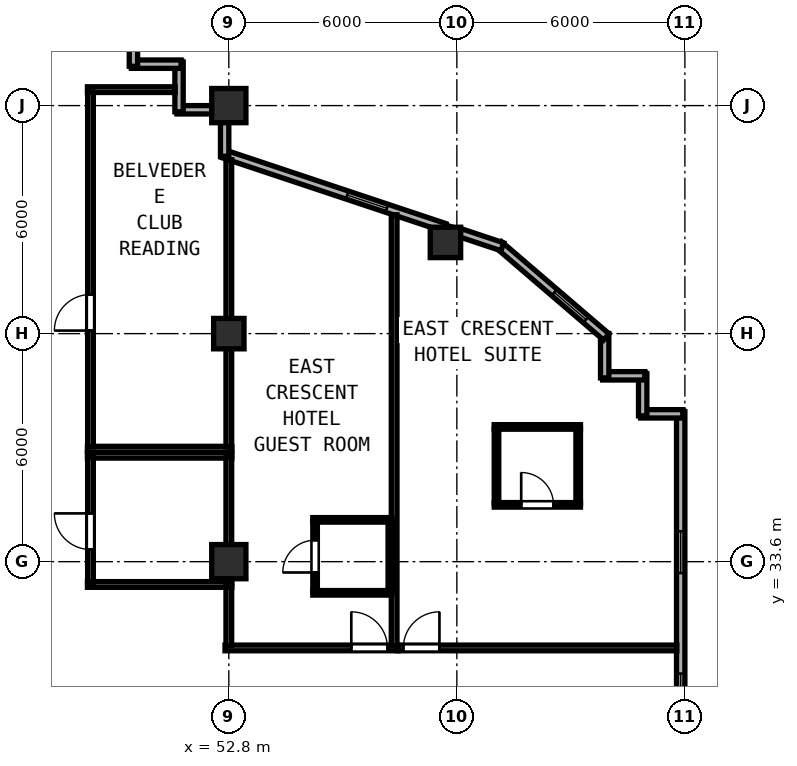
"""IFC4 building model, lengths in metres.
Left out: names, types, materials, properties, quantities, classifications, styles, units other than length and angle.
Written with IfcOpenShell. Run it as: python <this file> out.ifc"""

import sys

from ifc_helpers import new_model, si_unit, direction, frame, frame_2d, origin, origin_2d, place, context, subcontext, project, spatial, rectangle, hollow_rectangle, extrude, element, fill, save


model = new_model("IFC4")
c1 = context("Model", 3, precision=1e-05, world=origin(), true_north=direction((0.0, 1.0)))
c2 = subcontext(c1, "Body", "Model", "MODEL_VIEW")
j1 = project(units=[si_unit("LENGTHUNIT", "METRE"), si_unit("PLANEANGLEUNIT", "RADIAN")], contexts=[c1])
p1 = place(None, origin())
s1 = spatial("IfcSite", under=j1, at=p1, CompositionType="ELEMENT")
p2 = place(p1, origin())
s2 = spatial("IfcBuilding", under=s1, at=p2, CompositionType="ELEMENT")
p3 = place(p2, frame((0.0, 0.0, 199.4)))
s3 = spatial("IfcBuildingStorey", under=s2, at=p3, CompositionType="ELEMENT", Elevation=199.4)
for number, where, z_axis, x_axis in (
    (1, (52.8, 33.6, 0.0), (0.0, 0.0, 1.0), (1.0, 0.0, 0.0)),
    (2, (52.8, 45.6, 0.0), (0.0, 0.0, 1.0), (1.0, 0.0, 0.0)),
):
    element("IfcColumn", number, at=place(p3, frame(where, z_axis=z_axis, x_axis=x_axis)), inside=s3, PredefinedType="COLUMN", context=c2, shape_type="SweptSolid", body=[
        extrude(hollow_rectangle(XDim=0.9, YDim=0.9, WallThickness=0.034, at=origin_2d()), origin(), (0.0, 0.0, 1.0), 3.8),
    ])
for number, where, z_axis, x_axis in (
    (3, (52.8, 39.6, 0.0), (0.0, 0.0, 1.0), (1.0, 0.0, 0.0)),
    (4, (58.5, 42.0, 0.0), (0.0, 0.0, 1.0), (1.0, 0.0, 0.0)),
):
    element("IfcColumn", number, at=place(p3, frame(where, z_axis=z_axis, x_axis=x_axis)), inside=s3, PredefinedType="COLUMN", context=c2, shape_type="SweptSolid", body=[
        extrude(hollow_rectangle(XDim=0.8, YDim=0.8, WallThickness=0.03, at=origin_2d()), origin(), (0.0, 0.0, 1.0), 3.8),
    ])
p4 = place(p3, frame((64.69, 16.4, 0.0), z_axis=(0.0, 0.0, 1.0), x_axis=(0.0, 1.0, 0.0)))
e5 = element("IfcWall", 5, at=p4, inside=s3, PredefinedType="SOLIDWALL", context=c2, shape_type="SweptSolid", body=[
    extrude(rectangle(XDim=21.145, YDim=0.22, at=frame_2d((10.573, 0.0))), origin(), (0.0, 0.0, 1.0), 3.62),
])
p5 = place(p4, frame((1.05, 0.0, 0.85)))
e6 = element("IfcOpeningElement", 6, at=p5, cuts=e5, PredefinedType="OPENING", context=c2, shape_type="SweptSolid", body=[
    extrude(rectangle(XDim=1.1, YDim=1.75, at=frame_2d((0.55, 0.875))), frame((0.0, 0.12, 0.0), z_axis=(0.0, -1.0, 0.0), x_axis=(1.0, 0.0, 0.0)), (0.0, 0.0, 1.0), 0.24),
])
p6 = place(p4, frame((6.1, 0.0, 0.85)))
e7 = element("IfcOpeningElement", 7, at=p6, cuts=e5, PredefinedType="OPENING", context=c2, shape_type="SweptSolid", body=[
    extrude(rectangle(XDim=1.1, YDim=1.75, at=frame_2d((0.55, 0.875))), frame((0.0, 0.12, 0.0), z_axis=(0.0, -1.0, 0.0), x_axis=(1.0, 0.0, 0.0)), (0.0, 0.0, 1.0), 0.24),
])
p7 = place(p4, frame((13.155, 0.0, 0.85)))
e8 = element("IfcOpeningElement", 8, at=p7, cuts=e5, PredefinedType="OPENING", context=c2, shape_type="SweptSolid", body=[
    extrude(rectangle(XDim=1.1, YDim=1.75, at=frame_2d((0.55, 0.875))), frame((0.0, 0.12, 0.0), z_axis=(0.0, -1.0, 0.0), x_axis=(1.0, 0.0, 0.0)), (0.0, 0.0, 1.0), 0.24),
])
p8 = place(p4, frame((16.9, 0.0, 0.85)))
e9 = element("IfcOpeningElement", 9, at=p8, cuts=e5, PredefinedType="OPENING", context=c2, shape_type="SweptSolid", body=[
    extrude(rectangle(XDim=1.1, YDim=1.75, at=frame_2d((0.55, 0.875))), frame((0.0, 0.12, 0.0), z_axis=(0.0, -1.0, 0.0), x_axis=(1.0, 0.0, 0.0)), (0.0, 0.0, 1.0), 0.24),
])
p9 = place(p3, frame((64.745, 37.49, 0.0), z_axis=(0.0, 0.0, 1.0), x_axis=(-1.0, 0.0, 0.0)))
e10 = element("IfcWall", 10, at=p9, inside=s3, PredefinedType="SOLIDWALL", context=c2, shape_type="SweptSolid", body=[
    extrude(rectangle(XDim=1.11, YDim=0.22, at=frame_2d((0.555, 0.0))), origin(), (0.0, 0.0, 1.0), 3.62),
])
p10 = place(p3, frame((63.69, 37.435, 0.0), z_axis=(0.0, 0.0, 1.0), x_axis=(0.0, 1.0, 0.0)))
e11 = element("IfcWall", 11, at=p10, inside=s3, PredefinedType="SOLIDWALL", context=c2, shape_type="SweptSolid", body=[
    extrude(rectangle(XDim=1.11, YDim=0.22, at=frame_2d((0.555, 0.0))), origin(), (0.0, 0.0, 1.0), 3.62),
])
p11 = place(p3, frame((63.745, 38.49, 0.0), z_axis=(0.0, 0.0, 1.0), x_axis=(-1.0, 0.0, 0.0)))
e12 = element("IfcWall", 12, at=p11, inside=s3, PredefinedType="SOLIDWALL", context=c2, shape_type="SweptSolid", body=[
    extrude(rectangle(XDim=1.11, YDim=0.22, at=frame_2d((0.555, 0.0))), origin(), (0.0, 0.0, 1.0), 3.62),
])
p12 = place(p3, frame((62.69, 38.435, 0.0), z_axis=(0.0, 0.0, 1.0), x_axis=(0.0, 1.0, 0.0)))
e13 = element("IfcWall", 13, at=p12, inside=s3, PredefinedType="SOLIDWALL", context=c2, shape_type="SweptSolid", body=[
    extrude(rectangle(XDim=1.169, YDim=0.22, at=frame_2d((0.585, 0.0))), origin(), (0.0, 0.0, 1.0), 3.62),
])
p13 = place(p3, frame((62.732, 39.514, 0.0), z_axis=(0.0, 0.0, 1.0), x_axis=(-0.759251976569, 0.65079677018, 0.0)))
e14 = element("IfcWall", 14, at=p13, inside=s3, PredefinedType="SOLIDWALL", context=c2, shape_type="SweptSolid", body=[
    extrude(rectangle(XDim=3.726, YDim=0.22, at=frame_2d((1.863, 0.0))), origin(), (0.0, 0.0, 1.0), 3.62),
])
p14 = place(p13, frame((0.7, 0.0, 0.85)))
e15 = element("IfcOpeningElement", 15, at=p14, cuts=e14, PredefinedType="OPENING", context=c2, shape_type="SweptSolid", body=[
    extrude(rectangle(XDim=1.1, YDim=1.75, at=frame_2d((0.55, 0.875))), frame((0.0, 0.12, 0.0), z_axis=(0.0, -1.0, 0.0), x_axis=(1.0, 0.0, 0.0)), (0.0, 0.0, 1.0), 0.24),
])
p15 = place(p3, frame((59.997, 41.885, 0.0), z_axis=(0.0, 0.0, 1.0), x_axis=(-0.948662335685, 0.316290646166, 0.0)))
e16 = element("IfcWall", 16, at=p15, inside=s3, PredefinedType="SOLIDWALL", context=c2, shape_type="SweptSolid", body=[
    extrude(rectangle(XDim=1.165, YDim=0.22, at=frame_2d((0.583, 0.0))), origin(), (0.0, 0.0, 1.0), 3.62),
])
p16 = place(p3, frame((58.476, 42.392, 0.0), z_axis=(0.0, 0.0, 1.0), x_axis=(-0.948691231611, 0.316203964339, 0.0)))
e17 = element("IfcWall", 17, at=p16, inside=s3, PredefinedType="SOLIDWALL", context=c2, shape_type="SweptSolid", body=[
    extrude(rectangle(XDim=6.154, YDim=0.22, at=frame_2d((3.077, 0.0))), origin(), (0.0, 0.0, 1.0), 3.215),
])
p17 = place(p16, frame((1.599, 0.0, 0.85)))
e18 = element("IfcOpeningElement", 18, at=p17, cuts=e17, PredefinedType="OPENING", context=c2, shape_type="SweptSolid", body=[
    extrude(rectangle(XDim=1.1, YDim=1.75, at=frame_2d((0.55, 0.875))), frame((0.0, 0.12, 0.0), z_axis=(0.0, -1.0, 0.0), x_axis=(1.0, 0.0, 0.0)), (0.0, 0.0, 1.0), 0.24),
])
p18 = place(p3, frame((52.69, 44.266, 0.0), z_axis=(0.0, 0.0, 1.0), x_axis=(0.0, 1.0, 0.0)))
e19 = element("IfcWall", 19, at=p18, inside=s3, PredefinedType="SOLIDWALL", context=c2, shape_type="SweptSolid", body=[
    extrude(rectangle(XDim=0.892, YDim=0.22, at=frame_2d((0.446, 0.0))), origin(), (0.0, 0.0, 1.0), 3.215),
])
p19 = place(p3, frame((52.358, 45.49, 0.0), z_axis=(0.0, 0.0, 1.0), x_axis=(-1.0, 0.0, 0.0)))
e20 = element("IfcWall", 20, at=p19, inside=s3, PredefinedType="SOLIDWALL", context=c2, shape_type="SweptSolid", body=[
    extrude(rectangle(XDim=0.923, YDim=0.22, at=frame_2d((0.461, 0.0))), origin(), (0.0, 0.0, 1.0), 3.62),
])
p20 = place(p3, frame((51.49, 45.435, 0.0), z_axis=(0.0, 0.0, 1.0), x_axis=(0.0, 1.0, 0.0)))
e21 = element("IfcWall", 21, at=p20, inside=s3, PredefinedType="SOLIDWALL", context=c2, shape_type="SweptSolid", body=[
    extrude(rectangle(XDim=1.31, YDim=0.22, at=frame_2d((0.655, 0.0))), origin(), (0.0, 0.0, 1.0), 3.62),
])
p21 = place(p3, frame((51.545, 46.69, 0.0), z_axis=(0.0, 0.0, 1.0), x_axis=(-1.0, 0.0, 0.0)))
e22 = element("IfcWall", 22, at=p21, inside=s3, PredefinedType="SOLIDWALL", context=c2, shape_type="SweptSolid", body=[
    extrude(rectangle(XDim=1.31, YDim=0.22, at=frame_2d((0.655, 0.0))), origin(), (0.0, 0.0, 1.0), 3.62),
])
p22 = place(p3, frame((50.29, 46.635, 0.0), z_axis=(0.0, 0.0, 1.0), x_axis=(0.0, 1.0, 0.0)))
e23 = element("IfcWall", 23, at=p22, inside=s3, PredefinedType="SOLIDWALL", context=c2, shape_type="SweptSolid", body=[
    extrude(rectangle(XDim=1.535, YDim=0.22, at=frame_2d((0.768, 0.0))), origin(), (0.0, 0.0, 1.0), 3.62),
])
for number, where, z_axis, x_axis in (
    (24, (49.08, 36.4, 0.0), (0.0, 0.0, 1.0), (1.0, 0.0, 0.0)),
    (25, (49.08, 33.0, 0.0), (0.0, 0.0, 1.0), (1.0, 0.0, 0.0)),
):
    element("IfcWall", number, at=place(p3, frame(where, z_axis=z_axis, x_axis=x_axis)), inside=s3, PredefinedType="PARTITIONING", context=c2, shape_type="SweptSolid", body=[
        extrude(rectangle(XDim=3.8, YDim=0.15, at=frame_2d((1.9, 0.0))), origin(), (0.0, 0.0, 1.0), 3.62),
    ])
p23 = place(p3, frame((49.16, 33.06, 0.0), z_axis=(0.0, 0.0, 1.0), x_axis=(0.0, 1.0, 0.0)))
e26 = element("IfcWall", 26, at=p23, inside=s3, PredefinedType="PARTITIONING", context=c2, shape_type="SweptSolid", body=[
    extrude(rectangle(XDim=3.28, YDim=0.15, at=frame_2d((1.64, 0.0))), origin(), (0.0, 0.0, 1.0), 3.62),
])
p24 = place(p23, frame((0.86, 0.0, 0.0)))
e27 = element("IfcOpeningElement", 27, at=p24, cuts=e26, PredefinedType="OPENING", context=c2, shape_type="SweptSolid", body=[
    extrude(rectangle(XDim=0.95, YDim=2.12, at=frame_2d((0.475, 1.06))), frame((0.0, 0.085, 0.0), z_axis=(0.0, -1.0, 0.0), x_axis=(1.0, 0.0, 0.0)), (0.0, 0.0, 1.0), 0.17),
])
p25 = place(p3, frame((52.8, 33.06, 0.0), z_axis=(0.0, 0.0, 1.0), x_axis=(0.0, 1.0, 0.0)))
e28 = element("IfcWall", 28, at=p25, inside=s3, PredefinedType="PARTITIONING", context=c2, shape_type="SweptSolid", body=[
    extrude(rectangle(XDim=3.28, YDim=0.15, at=frame_2d((1.64, 0.0))), origin(), (0.0, 0.0, 1.0), 3.215),
])
p26 = place(p3, frame((49.08, 46.02, 0.0), z_axis=(0.0, 0.0, 1.0), x_axis=(1.0, 0.0, 0.0)))
e29 = element("IfcWall", 29, at=p26, inside=s3, PredefinedType="PARTITIONING", context=c2, shape_type="SweptSolid", body=[
    extrude(rectangle(XDim=2.308, YDim=0.15, at=frame_2d((1.154, 0.0))), origin(), (0.0, 0.0, 1.0), 3.62),
])
p27 = place(p3, frame((49.08, 36.56, 0.0), z_axis=(0.0, 0.0, 1.0), x_axis=(1.0, 0.0, 0.0)))
e30 = element("IfcWall", 30, at=p27, inside=s3, PredefinedType="PARTITIONING", context=c2, shape_type="SweptSolid", body=[
    extrude(rectangle(XDim=3.8, YDim=0.15, at=frame_2d((1.9, 0.0))), origin(), (0.0, 0.0, 1.0), 3.62),
])
p28 = place(p3, frame((49.16, 36.62, 0.0), z_axis=(0.0, 0.0, 1.0), x_axis=(0.0, 1.0, 0.0)))
e31 = element("IfcWall", 31, at=p28, inside=s3, PredefinedType="PARTITIONING", context=c2, shape_type="SweptSolid", body=[
    extrude(rectangle(XDim=9.34, YDim=0.15, at=frame_2d((4.67, 0.0))), origin(), (0.0, 0.0, 1.0), 3.62),
])
p29 = place(p28, frame((3.06, 0.0, 0.0)))
e32 = element("IfcOpeningElement", 32, at=p29, cuts=e31, PredefinedType="OPENING", context=c2, shape_type="SweptSolid", body=[
    extrude(rectangle(XDim=0.95, YDim=2.12, at=frame_2d((0.475, 1.06))), frame((0.0, 0.085, 0.0), z_axis=(0.0, -1.0, 0.0), x_axis=(1.0, 0.0, 0.0)), (0.0, 0.0, 1.0), 0.17),
])
p30 = place(p3, frame((52.8, 36.62, 0.0), z_axis=(0.0, 0.0, 1.0), x_axis=(0.0, 1.0, 0.0)))
e33 = element("IfcWall", 33, at=p30, inside=s3, PredefinedType="PARTITIONING", context=c2, shape_type="SweptSolid", body=[
    extrude(rectangle(XDim=7.556, YDim=0.15, at=frame_2d((3.778, 0.0))), origin(), (0.0, 0.0, 1.0), 3.215),
])
p31 = place(p3, frame((52.7, 31.33, 0.0), z_axis=(0.0, 0.0, 1.0), x_axis=(1.0, 0.0, 0.0)))
e34 = element("IfcWall", 34, at=p31, inside=s3, PredefinedType="PARTITIONING", context=c2, shape_type="SweptSolid", body=[
    extrude(rectangle(XDim=4.55, YDim=0.15, at=frame_2d((2.275, 0.0))), origin(), (0.0, 0.0, 1.0), 3.62),
])
p32 = place(p31, frame((3.323, 0.0, 0.0)))
e35 = element("IfcOpeningElement", 35, at=p32, cuts=e34, PredefinedType="OPENING", context=c2, shape_type="SweptSolid", body=[
    extrude(rectangle(XDim=0.95, YDim=2.15, at=frame_2d((0.475, 1.075))), frame((0.0, 0.085, 0.0), z_axis=(0.0, -1.0, 0.0), x_axis=(1.0, 0.0, 0.0)), (0.0, 0.0, 1.0), 0.17),
])
p33 = place(p3, frame((52.8, 31.39, 0.0), z_axis=(0.0, 0.0, 1.0), x_axis=(0.0, 1.0, 0.0)))
e36 = element("IfcWall", 36, at=p33, inside=s3, PredefinedType="PARTITIONING", context=c2, shape_type="SweptSolid", body=[
    extrude(rectangle(XDim=1.55, YDim=0.15, at=frame_2d((0.775, 0.0))), origin(), (0.0, 0.0, 1.0), 3.215),
])
p34 = place(p3, frame((57.15, 31.39, 0.0), z_axis=(0.0, 0.0, 1.0), x_axis=(0.0, 1.0, 0.0)))
e37 = element("IfcWall", 37, at=p34, inside=s3, PredefinedType="PARTITIONING", context=c2, shape_type="SweptSolid", body=[
    extrude(rectangle(XDim=11.337, YDim=0.15, at=frame_2d((5.668, 0.0))), origin(), (0.0, 0.0, 1.0), 3.62),
])
for number, where, z_axis, x_axis in (
    (38, (55.01, 34.7, 0.0), (0.0, 0.0, 1.0), (1.0, 0.0, 0.0)),
    (39, (55.01, 32.78, 0.0), (0.0, 0.0, 1.0), (1.0, 0.0, 0.0)),
):
    element("IfcWall", number, at=place(p3, frame(where, z_axis=z_axis, x_axis=x_axis)), inside=s3, PredefinedType="PARTITIONING", context=c2, shape_type="SweptSolid", body=[
        extrude(rectangle(XDim=2.08, YDim=0.12, at=frame_2d((1.04, 0.0))), origin(), (0.0, 0.0, 1.0), 3.62),
    ])
p35 = place(p3, frame((55.07, 32.825, 0.0), z_axis=(0.0, 0.0, 1.0), x_axis=(0.0, 1.0, 0.0)))
e40 = element("IfcWall", 40, at=p35, inside=s3, PredefinedType="PARTITIONING", context=c2, shape_type="SweptSolid", body=[
    extrude(rectangle(XDim=1.83, YDim=0.12, at=frame_2d((0.915, 0.0))), origin(), (0.0, 0.0, 1.0), 3.62),
])
p36 = place(p35, frame((1.34, 0.0, 0.0), z_axis=(0.0, 0.0, 1.0), x_axis=(-1.0, 0.0, 0.0)))
e41 = element("IfcOpeningElement", 41, at=p36, cuts=e40, PredefinedType="OPENING", context=c2, shape_type="SweptSolid", body=[
    extrude(rectangle(XDim=0.85, YDim=2.1, at=frame_2d((0.425, 1.05))), frame((0.0, 0.07, 0.0), z_axis=(0.0, -1.0, 0.0), x_axis=(1.0, 0.0, 0.0)), (0.0, 0.0, 1.0), 0.14),
])
p37 = place(p3, frame((57.05, 32.825, 0.0), z_axis=(0.0, 0.0, 1.0), x_axis=(0.0, 1.0, 0.0)))
e42 = element("IfcWall", 42, at=p37, inside=s3, PredefinedType="PARTITIONING", context=c2, shape_type="SweptSolid", body=[
    extrude(rectangle(XDim=1.83, YDim=0.12, at=frame_2d((0.915, 0.0))), origin(), (0.0, 0.0, 1.0), 3.62),
])
p38 = place(p3, frame((57.252, 31.33, 0.0), z_axis=(0.0, 0.0, 1.0), x_axis=(1.0, 0.0, 0.0)))
e43 = element("IfcWall", 43, at=p38, inside=s3, PredefinedType="PARTITIONING", context=c2, shape_type="SweptSolid", body=[
    extrude(rectangle(XDim=7.336, YDim=0.15, at=frame_2d((3.668, 0.0))), origin(), (0.0, 0.0, 1.0), 3.62),
])
p39 = place(p38, frame((0.14, 0.0, 0.0)))
e44 = element("IfcOpeningElement", 44, at=p39, cuts=e43, PredefinedType="OPENING", context=c2, shape_type="SweptSolid", body=[
    extrude(rectangle(XDim=0.95, YDim=2.18, at=frame_2d((0.475, 1.09))), frame((0.0, 0.085, 0.0), z_axis=(0.0, -1.0, 0.0), x_axis=(1.0, 0.0, 0.0)), (0.0, 0.0, 1.0), 0.17),
])
p40 = place(p3, frame((59.783, 37.145, 0.0), z_axis=(0.0, 0.0, 1.0), x_axis=(1.0, 0.0, 0.0)))
e45 = element("IfcWall", 45, at=p40, inside=s3, PredefinedType="PARTITIONING", context=c2, shape_type="SweptSolid", body=[
    extrude(rectangle(XDim=2.27, YDim=0.12, at=frame_2d((1.135, 0.0))), origin(), (0.0, 0.0, 1.0), 3.62),
])
p41 = place(p3, frame((59.783, 35.095, 0.0), z_axis=(0.0, 0.0, 1.0), x_axis=(1.0, 0.0, 0.0)))
e46 = element("IfcWall", 46, at=p41, inside=s3, PredefinedType="PARTITIONING", context=c2, shape_type="SweptSolid", body=[
    extrude(rectangle(XDim=2.27, YDim=0.12, at=frame_2d((1.135, 0.0))), origin(), (0.0, 0.0, 1.0), 3.62),
])
p42 = place(p41, frame((0.71, 0.0, 0.0)))
e47 = element("IfcOpeningElement", 47, at=p42, cuts=e46, PredefinedType="OPENING", context=c2, shape_type="SweptSolid", body=[
    extrude(rectangle(XDim=0.85, YDim=2.1, at=frame_2d((0.425, 1.05))), frame((0.0, 0.07, 0.0), z_axis=(0.0, -1.0, 0.0), x_axis=(1.0, 0.0, 0.0)), (0.0, 0.0, 1.0), 0.14),
])
for number, where, z_axis, x_axis in (
    (48, (59.843, 35.14, 0.0), (0.0, 0.0, 1.0), (0.0, 1.0, 0.0)),
    (49, (61.993, 35.14, 0.0), (0.0, 0.0, 1.0), (0.0, 1.0, 0.0)),
):
    element("IfcWall", number, at=place(p3, frame(where, z_axis=z_axis, x_axis=x_axis)), inside=s3, PredefinedType="PARTITIONING", context=c2, shape_type="SweptSolid", body=[
        extrude(rectangle(XDim=1.96, YDim=0.12, at=frame_2d((0.98, 0.0))), origin(), (0.0, 0.0, 1.0), 3.62),
    ])
p43 = place(p7, origin())
e50 = element("IfcWindow", 50, at=p43, inside=s3, PartitioningType="SINGLE_PANEL", PredefinedType="WINDOW", context=c2, shape_type="SweptSolid", body=[
    extrude(rectangle(XDim=1.1, YDim=1.75, at=frame_2d((0.55, 0.875))), frame((0.0, 0.03, 0.0), z_axis=(0.0, -1.0, 0.0), x_axis=(1.0, 0.0, 0.0)), (0.0, 0.0, 1.0), 0.06),
])
fill(e8, e50)
p44 = place(p8, origin())
e51 = element("IfcWindow", 51, at=p44, inside=s3, PartitioningType="SINGLE_PANEL", PredefinedType="WINDOW", context=c2, shape_type="SweptSolid", body=[
    extrude(rectangle(XDim=1.1, YDim=1.75, at=frame_2d((0.55, 0.875))), frame((0.0, 0.03, 0.0), z_axis=(0.0, -1.0, 0.0), x_axis=(1.0, 0.0, 0.0)), (0.0, 0.0, 1.0), 0.06),
])
fill(e9, e51)
p45 = place(p14, origin())
e52 = element("IfcWindow", 52, at=p45, inside=s3, PartitioningType="SINGLE_PANEL", PredefinedType="WINDOW", context=c2, shape_type="SweptSolid", body=[
    extrude(rectangle(XDim=1.1, YDim=1.75, at=frame_2d((0.55, 0.875))), frame((0.0, 0.03, 0.0), z_axis=(0.0, -1.0, 0.0), x_axis=(1.0, 0.0, 0.0)), (0.0, 0.0, 1.0), 0.06),
])
fill(e15, e52)
p46 = place(p17, origin())
e53 = element("IfcWindow", 53, at=p46, inside=s3, PartitioningType="SINGLE_PANEL", PredefinedType="WINDOW", context=c2, shape_type="SweptSolid", body=[
    extrude(rectangle(XDim=1.1, YDim=1.75, at=frame_2d((0.55, 0.875))), frame((0.0, 0.03, 0.0), z_axis=(0.0, -1.0, 0.0), x_axis=(1.0, 0.0, 0.0)), (0.0, 0.0, 1.0), 0.06),
])
fill(e18, e53)
p47 = place(p24, origin())
e54 = element("IfcDoor", 54, at=p47, inside=s3, OperationType="SINGLE_SWING_RIGHT", PredefinedType="DOOR", context=c2, shape_type="SweptSolid", body=[
    extrude(rectangle(XDim=0.95, YDim=2.12, at=frame_2d((0.475, 1.06))), frame((0.0, 0.025, 0.0), z_axis=(0.0, -1.0, 0.0), x_axis=(1.0, 0.0, 0.0)), (0.0, 0.0, 1.0), 0.05),
])
fill(e27, e54)
p48 = place(p29, origin())
e55 = element("IfcDoor", 55, at=p48, inside=s3, OperationType="SINGLE_SWING_LEFT", PredefinedType="DOOR", context=c2, shape_type="SweptSolid", body=[
    extrude(rectangle(XDim=0.95, YDim=2.12, at=frame_2d((0.475, 1.06))), frame((0.0, 0.025, 0.0), z_axis=(0.0, -1.0, 0.0), x_axis=(1.0, 0.0, 0.0)), (0.0, 0.0, 1.0), 0.05),
])
fill(e32, e55)
p49 = place(p32, origin())
e56 = element("IfcDoor", 56, at=p49, inside=s3, OperationType="SINGLE_SWING_LEFT", PredefinedType="DOOR", context=c2, shape_type="SweptSolid", body=[
    extrude(rectangle(XDim=0.95, YDim=2.15, at=frame_2d((0.475, 1.075))), frame((0.0, 0.025, 0.0), z_axis=(0.0, -1.0, 0.0), x_axis=(1.0, 0.0, 0.0)), (0.0, 0.0, 1.0), 0.05),
])
fill(e35, e56)
p50 = place(p36, origin())
e57 = element("IfcDoor", 57, at=p50, inside=s3, OperationType="SINGLE_SWING_RIGHT", PredefinedType="DOOR", context=c2, shape_type="SweptSolid", body=[
    extrude(rectangle(XDim=0.85, YDim=2.1, at=frame_2d((0.425, 1.05))), frame((0.0, 0.025, 0.0), z_axis=(0.0, -1.0, 0.0), x_axis=(1.0, 0.0, 0.0)), (0.0, 0.0, 1.0), 0.05),
])
fill(e41, e57)
p51 = place(p39, origin())
e58 = element("IfcDoor", 58, at=p51, inside=s3, OperationType="SINGLE_SWING_RIGHT", PredefinedType="DOOR", context=c2, shape_type="SweptSolid", body=[
    extrude(rectangle(XDim=0.95, YDim=2.18, at=frame_2d((0.475, 1.09))), frame((0.0, 0.025, 0.0), z_axis=(0.0, -1.0, 0.0), x_axis=(1.0, 0.0, 0.0)), (0.0, 0.0, 1.0), 0.05),
])
fill(e44, e58)
p52 = place(p42, origin())
e59 = element("IfcDoor", 59, at=p52, inside=s3, OperationType="SINGLE_SWING_LEFT", PredefinedType="DOOR", context=c2, shape_type="SweptSolid", body=[
    extrude(rectangle(XDim=0.85, YDim=2.1, at=frame_2d((0.425, 1.05))), frame((0.0, 0.025, 0.0), z_axis=(0.0, -1.0, 0.0), x_axis=(1.0, 0.0, 0.0)), (0.0, 0.0, 1.0), 0.05),
])
fill(e47, e59)
save(model, sys.argv[1])
